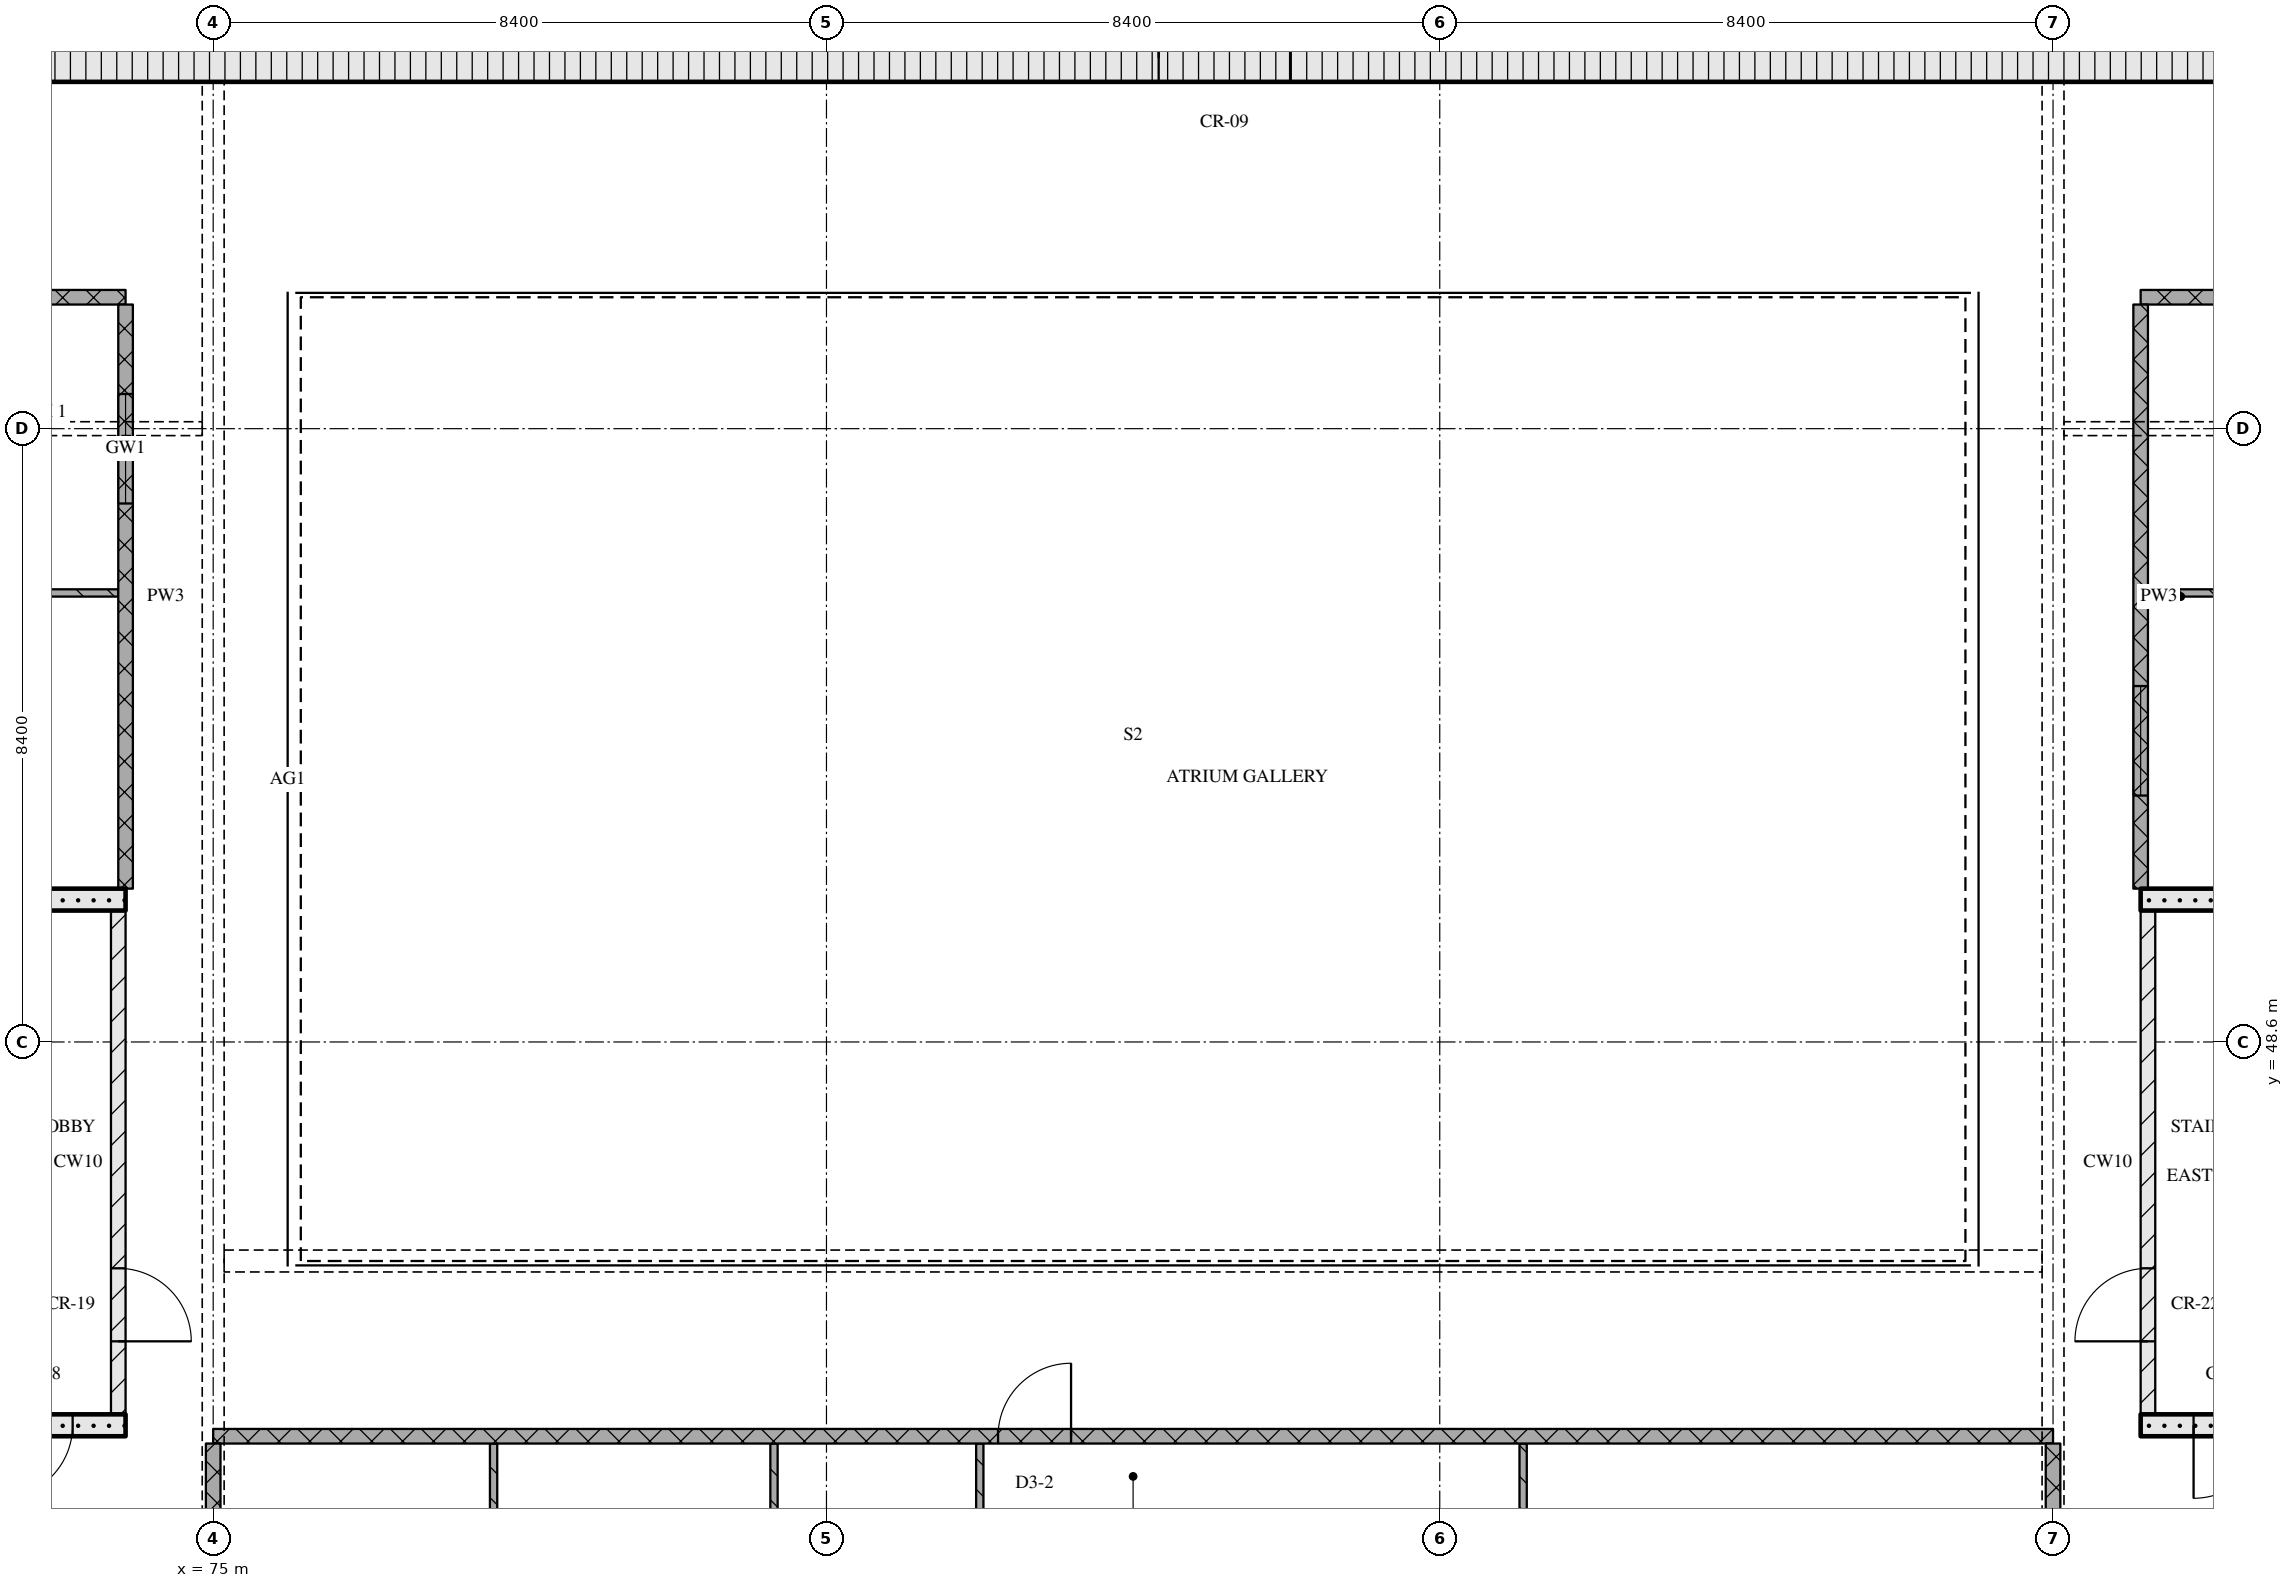
"""IFC4 building model, lengths in metres.
Left out: names, types, materials, properties, quantities, classifications, styles, units other than length and angle.
Written with IfcOpenShell. Run it as: python <this file> out.ifc"""

import sys

from ifc_helpers import new_model, si_unit, direction, frame, frame_2d, origin, place, context, subcontext, project, spatial, rectangle, extrude, element, fill, save


model = new_model("IFC4")
c1 = context("Model", 3, precision=1e-05, world=origin(), true_north=direction((0.0, 1.0)))
c2 = subcontext(c1, "Body", "Model", "MODEL_VIEW")
j1 = project(units=[si_unit("LENGTHUNIT", "METRE"), si_unit("PLANEANGLEUNIT", "RADIAN")], contexts=[c1])
p1 = place(None, origin())
s1 = spatial("IfcSite", under=j1, at=p1, CompositionType="ELEMENT")
p2 = place(p1, origin())
s2 = spatial("IfcBuilding", under=s1, at=p2, CompositionType="ELEMENT")
p3 = place(p2, frame((0.0, 0.0, 227.1)))
s3 = spatial("IfcBuildingStorey", under=s2, at=p3, CompositionType="ELEMENT", Elevation=227.1)
p4 = place(p3, frame((67.15, 62.075, 0.0), z_axis=(0.0, 0.0, 1.0), x_axis=(1.0, 0.0, 0.0)))
e1 = element("IfcWall", 1, at=p4, inside=s3, PredefinedType="SOLIDWALL", context=c2, shape_type="SweptSolid", body=[
    extrude(rectangle(XDim=40.9, YDim=0.65, at=frame_2d((20.45, 0.0))), origin(), (0.0, 0.0, 1.0), 3.32),
])
p5 = place(p4, frame((20.8, 0.0, 0.0)))
e2 = element("IfcOpeningElement", 2, at=p5, cuts=e1, PredefinedType="OPENING", context=c2, shape_type="SweptSolid", body=[
    extrude(rectangle(XDim=1.8, YDim=2.1, at=frame_2d((0.9, 1.05))), frame((0.0, 0.335, 0.0), z_axis=(0.0, -1.0, 0.0), x_axis=(1.0, 0.0, 0.0)), (0.0, 0.0, 1.0), 0.67),
])
p6 = place(p3, frame((68.2, 43.35, 0.0), z_axis=(0.0, 0.0, 1.0), x_axis=(1.0, 0.0, 0.0)))
e3 = element("IfcWall", 3, at=p6, inside=s3, PredefinedType="SOLIDWALL", context=c2, shape_type="SweptSolid", body=[
    extrude(rectangle(XDim=5.6, YDim=0.3, at=frame_2d((2.8, 0.0))), origin(), (0.0, 0.0, 1.0), 3.32),
])
p7 = place(p6, frame((3.875, 0.0, 0.0)))
e4 = element("IfcOpeningElement", 4, at=p7, cuts=e3, PredefinedType="OPENING", context=c2, shape_type="SweptSolid", body=[
    extrude(rectangle(XDim=1.0, YDim=2.1, at=frame_2d((0.5, 1.05))), frame((0.0, 0.16, 0.0), z_axis=(0.0, -1.0, 0.0), x_axis=(1.0, 0.0, 0.0)), (0.0, 0.0, 1.0), 0.32),
])
p8 = place(p3, frame((73.7, 43.5, 0.0), z_axis=(0.0, 0.0, 1.0), x_axis=(0.0, 1.0, 0.0)))
e5 = element("IfcWall", 5, at=p8, inside=s3, PredefinedType="PARTITIONING", context=c2, shape_type="SweptSolid", body=[
    extrude(rectangle(XDim=6.9, YDim=0.2, at=frame_2d((3.45, 0.0))), origin(), (0.0, 0.0, 1.0), 3.32),
])
p9 = place(p8, frame((1.0, 0.0, 0.0)))
e6 = element("IfcOpeningElement", 6, at=p9, cuts=e5, PredefinedType="OPENING", context=c2, shape_type="SweptSolid", body=[
    extrude(rectangle(XDim=1.0, YDim=2.1, at=frame_2d((0.5, 1.05))), frame((0.0, 0.11, 0.0), z_axis=(0.0, -1.0, 0.0), x_axis=(1.0, 0.0, 0.0)), (0.0, 0.0, 1.0), 0.22),
])
p10 = place(p3, frame((68.2, 50.55, 0.0), z_axis=(0.0, 0.0, 1.0), x_axis=(1.0, 0.0, 0.0)))
e7 = element("IfcWall", 7, at=p10, inside=s3, PredefinedType="SOLIDWALL", context=c2, shape_type="SweptSolid", body=[
    extrude(rectangle(XDim=5.6, YDim=0.3, at=frame_2d((2.8, 0.0))), origin(), (0.0, 0.0, 1.0), 3.32),
])
p11 = place(p3, frame((101.4, 43.35, 0.0), z_axis=(0.0, 0.0, 1.0), x_axis=(1.0, 0.0, 0.0)))
e8 = element("IfcWall", 8, at=p11, inside=s3, PredefinedType="SOLIDWALL", context=c2, shape_type="SweptSolid", body=[
    extrude(rectangle(XDim=5.6, YDim=0.3, at=frame_2d((2.8, 0.0))), origin(), (0.0, 0.0, 1.0), 3.32),
])
p12 = place(p11, frame((0.725, 0.0, 0.0)))
e9 = element("IfcOpeningElement", 9, at=p12, cuts=e8, PredefinedType="OPENING", context=c2, shape_type="SweptSolid", body=[
    extrude(rectangle(XDim=1.0, YDim=2.1, at=frame_2d((0.5, 1.05))), frame((0.0, 0.16, 0.0), z_axis=(0.0, -1.0, 0.0), x_axis=(1.0, 0.0, 0.0)), (0.0, 0.0, 1.0), 0.32),
])
p13 = place(p3, frame((101.5, 43.5, 0.0), z_axis=(0.0, 0.0, 1.0), x_axis=(0.0, 1.0, 0.0)))
e10 = element("IfcWall", 10, at=p13, inside=s3, PredefinedType="PARTITIONING", context=c2, shape_type="SweptSolid", body=[
    extrude(rectangle(XDim=6.9, YDim=0.2, at=frame_2d((3.45, 0.0))), origin(), (0.0, 0.0, 1.0), 3.32),
])
p14 = place(p13, frame((1.0, 0.0, 0.0)))
e11 = element("IfcOpeningElement", 11, at=p14, cuts=e10, PredefinedType="OPENING", context=c2, shape_type="SweptSolid", body=[
    extrude(rectangle(XDim=1.0, YDim=2.1, at=frame_2d((0.5, 1.05))), frame((0.0, 0.11, 0.0), z_axis=(0.0, -1.0, 0.0), x_axis=(1.0, 0.0, 0.0)), (0.0, 0.0, 1.0), 0.22),
])
p15 = place(p3, frame((101.4, 50.55, 0.0), z_axis=(0.0, 0.0, 1.0), x_axis=(1.0, 0.0, 0.0)))
e12 = element("IfcWall", 12, at=p15, inside=s3, PredefinedType="SOLIDWALL", context=c2, shape_type="SweptSolid", body=[
    extrude(rectangle(XDim=5.6, YDim=0.3, at=frame_2d((2.8, 0.0))), origin(), (0.0, 0.0, 1.0), 3.32),
])
p16 = place(p3, frame((100.2, 43.2, 0.0), z_axis=(0.0, 0.0, 1.0), x_axis=(-1.0, 0.0, 0.0)))
e13 = element("IfcWall", 13, at=p16, inside=s3, PredefinedType="PARTITIONING", context=c2, shape_type="SweptSolid", body=[
    extrude(rectangle(XDim=25.2, YDim=0.2, at=frame_2d((12.6, 0.0))), origin(), (0.0, 0.0, 1.0), 3.32),
])
p17 = place(p16, frame((13.45, 0.0, 0.0)))
e14 = element("IfcOpeningElement", 14, at=p17, cuts=e13, PredefinedType="OPENING", context=c2, shape_type="SweptSolid", body=[
    extrude(rectangle(XDim=1.0, YDim=2.1, at=frame_2d((0.5, 1.05))), frame((0.0, 0.11, 0.0), z_axis=(0.0, -1.0, 0.0), x_axis=(1.0, 0.0, 0.0)), (0.0, 0.0, 1.0), 0.22),
])
p18 = place(p3, frame((69.3, 54.75, 0.0), z_axis=(0.0, 0.0, 1.0), x_axis=(1.0, 0.0, 0.0)))
e15 = element("IfcWall", 15, at=p18, inside=s3, PredefinedType="PARTITIONING", context=c2, shape_type="SweptSolid", body=[
    extrude(rectangle(XDim=4.4, YDim=0.1, at=frame_2d((2.2, 0.0))), origin(), (0.0, 0.0, 1.0), 3.32),
])
p19 = place(p3, frame((105.9, 54.75, 0.0), z_axis=(0.0, 0.0, 1.0), x_axis=(-1.0, 0.0, 0.0)))
e16 = element("IfcWall", 16, at=p19, inside=s3, PredefinedType="PARTITIONING", context=c2, shape_type="SweptSolid", body=[
    extrude(rectangle(XDim=4.4, YDim=0.1, at=frame_2d((2.2, 0.0))), origin(), (0.0, 0.0, 1.0), 3.32),
])
p20 = place(p19, frame((1.8, 0.0, 0.0)))
e17 = element("IfcOpeningElement", 17, at=p20, cuts=e16, PredefinedType="OPENING", context=c2, shape_type="SweptSolid", body=[
    extrude(rectangle(XDim=0.9, YDim=2.1, at=frame_2d((0.45, 1.05))), frame((0.0, 0.06, 0.0), z_axis=(0.0, -1.0, 0.0), x_axis=(1.0, 0.0, 0.0)), (0.0, 0.0, 1.0), 0.12),
])
p21 = place(p3, frame((63.0, 58.8, 0.0), z_axis=(0.0, 0.0, 1.0), x_axis=(1.0, 0.0, 0.0)))
e18 = element("IfcWall", 18, at=p21, inside=s3, PredefinedType="PARTITIONING", context=c2, shape_type="SweptSolid", body=[
    extrude(rectangle(XDim=10.8, YDim=0.2, at=frame_2d((5.4, 0.0))), origin(), (0.0, 0.0, 1.0), 3.32),
])
p22 = place(p3, frame((112.2, 58.8, 0.0), z_axis=(0.0, 0.0, 1.0), x_axis=(-1.0, 0.0, 0.0)))
e19 = element("IfcWall", 19, at=p22, inside=s3, PredefinedType="PARTITIONING", context=c2, shape_type="SweptSolid", body=[
    extrude(rectangle(XDim=10.8, YDim=0.2, at=frame_2d((5.4, 0.0))), origin(), (0.0, 0.0, 1.0), 3.32),
])
p23 = place(p22, frame((6.45, 0.0, 0.0)))
e20 = element("IfcOpeningElement", 20, at=p23, cuts=e19, PredefinedType="OPENING", context=c2, shape_type="SweptSolid", body=[
    extrude(rectangle(XDim=1.0, YDim=2.1, at=frame_2d((0.5, 1.05))), frame((0.0, 0.11, 0.0), z_axis=(0.0, -1.0, 0.0), x_axis=(1.0, 0.0, 0.0)), (0.0, 0.0, 1.0), 0.22),
])
p24 = place(p3, frame((73.8, 58.7, 0.0), z_axis=(0.0, 0.0, 1.0), x_axis=(0.0, -1.0, 0.0)))
e21 = element("IfcWall", 21, at=p24, inside=s3, PredefinedType="PARTITIONING", context=c2, shape_type="SweptSolid", body=[
    extrude(rectangle(XDim=8.0, YDim=0.2, at=frame_2d((4.0, 0.0))), origin(), (0.0, 0.0, 1.0), 3.32),
])
p25 = place(p24, frame((1.225, 0.0, 0.9)))
e22 = element("IfcOpeningElement", 22, at=p25, cuts=e21, PredefinedType="OPENING", context=c2, shape_type="SweptSolid", body=[
    extrude(rectangle(XDim=1.5, YDim=1.5, at=frame_2d((0.75, 0.75))), frame((0.0, 0.11, 0.0), z_axis=(0.0, -1.0, 0.0), x_axis=(1.0, 0.0, 0.0)), (0.0, 0.0, 1.0), 0.22),
])
p26 = place(p3, frame((75.0, 43.1, 0.0), z_axis=(0.0, 0.0, 1.0), x_axis=(0.0, -1.0, 0.0)))
e23 = element("IfcWall", 23, at=p26, inside=s3, PredefinedType="PARTITIONING", context=c2, shape_type="SweptSolid", body=[
    extrude(rectangle(XDim=2.2, YDim=0.2, at=frame_2d((1.1, 0.0))), origin(), (0.0, 0.0, 1.0), 2.53),
])
for number, where, z_axis, x_axis in (
    (24, (78.841, 43.1, 0.0), (0.0, 0.0, 1.0), (0.0, -1.0, 0.0)),
    (25, (82.681, 43.1, 0.0), (0.0, 0.0, 1.0), (0.0, -1.0, 0.0)),
    (26, (85.5, 43.1, 0.0), (0.0, 0.0, 1.0), (0.0, -1.0, 0.0)),
    (27, (92.942, 43.1, 0.0), (0.0, 0.0, 1.0), (0.0, -1.0, 0.0)),
):
    element("IfcWall", number, at=place(p3, frame(where, z_axis=z_axis, x_axis=x_axis)), inside=s3, PredefinedType="PARTITIONING", context=c2, shape_type="SweptSolid", body=[
        extrude(rectangle(XDim=6.75, YDim=0.1, at=frame_2d((3.375, 0.0))), origin(), (0.0, 0.0, 1.0), 3.32),
    ])
p27 = place(p3, frame((100.2, 43.1, 0.0), z_axis=(0.0, 0.0, 1.0), x_axis=(0.0, -1.0, 0.0)))
e28 = element("IfcWall", 28, at=p27, inside=s3, PredefinedType="PARTITIONING", context=c2, shape_type="SweptSolid", body=[
    extrude(rectangle(XDim=2.2, YDim=0.2, at=frame_2d((1.1, 0.0))), origin(), (0.0, 0.0, 1.0), 2.53),
])
p28 = place(p3, frame((101.4, 58.7, 0.0), z_axis=(0.0, 0.0, 1.0), x_axis=(0.0, -1.0, 0.0)))
e29 = element("IfcWall", 29, at=p28, inside=s3, PredefinedType="PARTITIONING", context=c2, shape_type="SweptSolid", body=[
    extrude(rectangle(XDim=8.0, YDim=0.2, at=frame_2d((4.0, 0.0))), origin(), (0.0, 0.0, 1.0), 3.32),
])
p29 = place(p28, frame((5.225, 0.0, 0.9)))
e30 = element("IfcOpeningElement", 30, at=p29, cuts=e29, PredefinedType="OPENING", context=c2, shape_type="SweptSolid", body=[
    extrude(rectangle(XDim=1.5, YDim=1.5, at=frame_2d((0.75, 0.75))), frame((0.0, 0.11, 0.0), z_axis=(0.0, -1.0, 0.0), x_axis=(1.0, 0.0, 0.0)), (0.0, 0.0, 1.0), 0.22),
])
p30 = place(p5, origin())
e31 = element("IfcDoor", 31, at=p30, inside=s3, OperationType="DOUBLE_DOOR_SINGLE_SWING", PredefinedType="DOOR", context=c2, shape_type="SweptSolid", body=[
    extrude(rectangle(XDim=1.8, YDim=2.1, at=frame_2d((0.9, 1.05))), frame((0.0, 0.025, 0.0), z_axis=(0.0, -1.0, 0.0), x_axis=(1.0, 0.0, 0.0)), (0.0, 0.0, 1.0), 0.05),
])
fill(e2, e31)
p31 = place(p7, origin())
e32 = element("IfcDoor", 32, at=p31, inside=s3, OperationType="SINGLE_SWING_RIGHT", PredefinedType="DOOR", context=c2, shape_type="SweptSolid", body=[
    extrude(rectangle(XDim=1.0, YDim=2.1, at=frame_2d((0.5, 1.05))), frame((0.0, 0.025, 0.0), z_axis=(0.0, -1.0, 0.0), x_axis=(1.0, 0.0, 0.0)), (0.0, 0.0, 1.0), 0.05),
])
fill(e4, e32)
p32 = place(p9, origin())
e33 = element("IfcDoor", 33, at=p32, inside=s3, OperationType="SINGLE_SWING_RIGHT", PredefinedType="DOOR", context=c2, shape_type="SweptSolid", body=[
    extrude(rectangle(XDim=1.0, YDim=2.1, at=frame_2d((0.5, 1.05))), frame((0.0, 0.025, 0.0), z_axis=(0.0, -1.0, 0.0), x_axis=(1.0, 0.0, 0.0)), (0.0, 0.0, 1.0), 0.05),
])
fill(e6, e33)
p33 = place(p12, origin())
e34 = element("IfcDoor", 34, at=p33, inside=s3, OperationType="SINGLE_SWING_RIGHT", PredefinedType="DOOR", context=c2, shape_type="SweptSolid", body=[
    extrude(rectangle(XDim=1.0, YDim=2.1, at=frame_2d((0.5, 1.05))), frame((0.0, 0.025, 0.0), z_axis=(0.0, -1.0, 0.0), x_axis=(1.0, 0.0, 0.0)), (0.0, 0.0, 1.0), 0.05),
])
fill(e9, e34)
p34 = place(p14, origin())
e35 = element("IfcDoor", 35, at=p34, inside=s3, OperationType="SINGLE_SWING_LEFT", PredefinedType="DOOR", context=c2, shape_type="SweptSolid", body=[
    extrude(rectangle(XDim=1.0, YDim=2.1, at=frame_2d((0.5, 1.05))), frame((0.0, 0.025, 0.0), z_axis=(0.0, -1.0, 0.0), x_axis=(1.0, 0.0, 0.0)), (0.0, 0.0, 1.0), 0.05),
])
fill(e11, e35)
p35 = place(p17, origin())
e36 = element("IfcDoor", 36, at=p35, inside=s3, OperationType="SINGLE_SWING_RIGHT", PredefinedType="DOOR", context=c2, shape_type="SweptSolid", body=[
    extrude(rectangle(XDim=1.0, YDim=2.1, at=frame_2d((0.5, 1.05))), frame((0.0, 0.025, 0.0), z_axis=(0.0, -1.0, 0.0), x_axis=(1.0, 0.0, 0.0)), (0.0, 0.0, 1.0), 0.05),
])
fill(e14, e36)
p36 = place(p25, origin())
e37 = element("IfcWindow", 37, at=p36, inside=s3, PartitioningType="SINGLE_PANEL", PredefinedType="WINDOW", context=c2, shape_type="SweptSolid", body=[
    extrude(rectangle(XDim=1.5, YDim=1.5, at=frame_2d((0.75, 0.75))), frame((0.0, 0.03, 0.0), z_axis=(0.0, -1.0, 0.0), x_axis=(1.0, 0.0, 0.0)), (0.0, 0.0, 1.0), 0.06),
])
fill(e22, e37)
p37 = place(p29, origin())
e38 = element("IfcWindow", 38, at=p37, inside=s3, PartitioningType="SINGLE_PANEL", PredefinedType="WINDOW", context=c2, shape_type="SweptSolid", body=[
    extrude(rectangle(XDim=1.5, YDim=1.5, at=frame_2d((0.75, 0.75))), frame((0.0, 0.03, 0.0), z_axis=(0.0, -1.0, 0.0), x_axis=(1.0, 0.0, 0.0)), (0.0, 0.0, 1.0), 0.06),
])
fill(e30, e38)
save(model, sys.argv[1])
